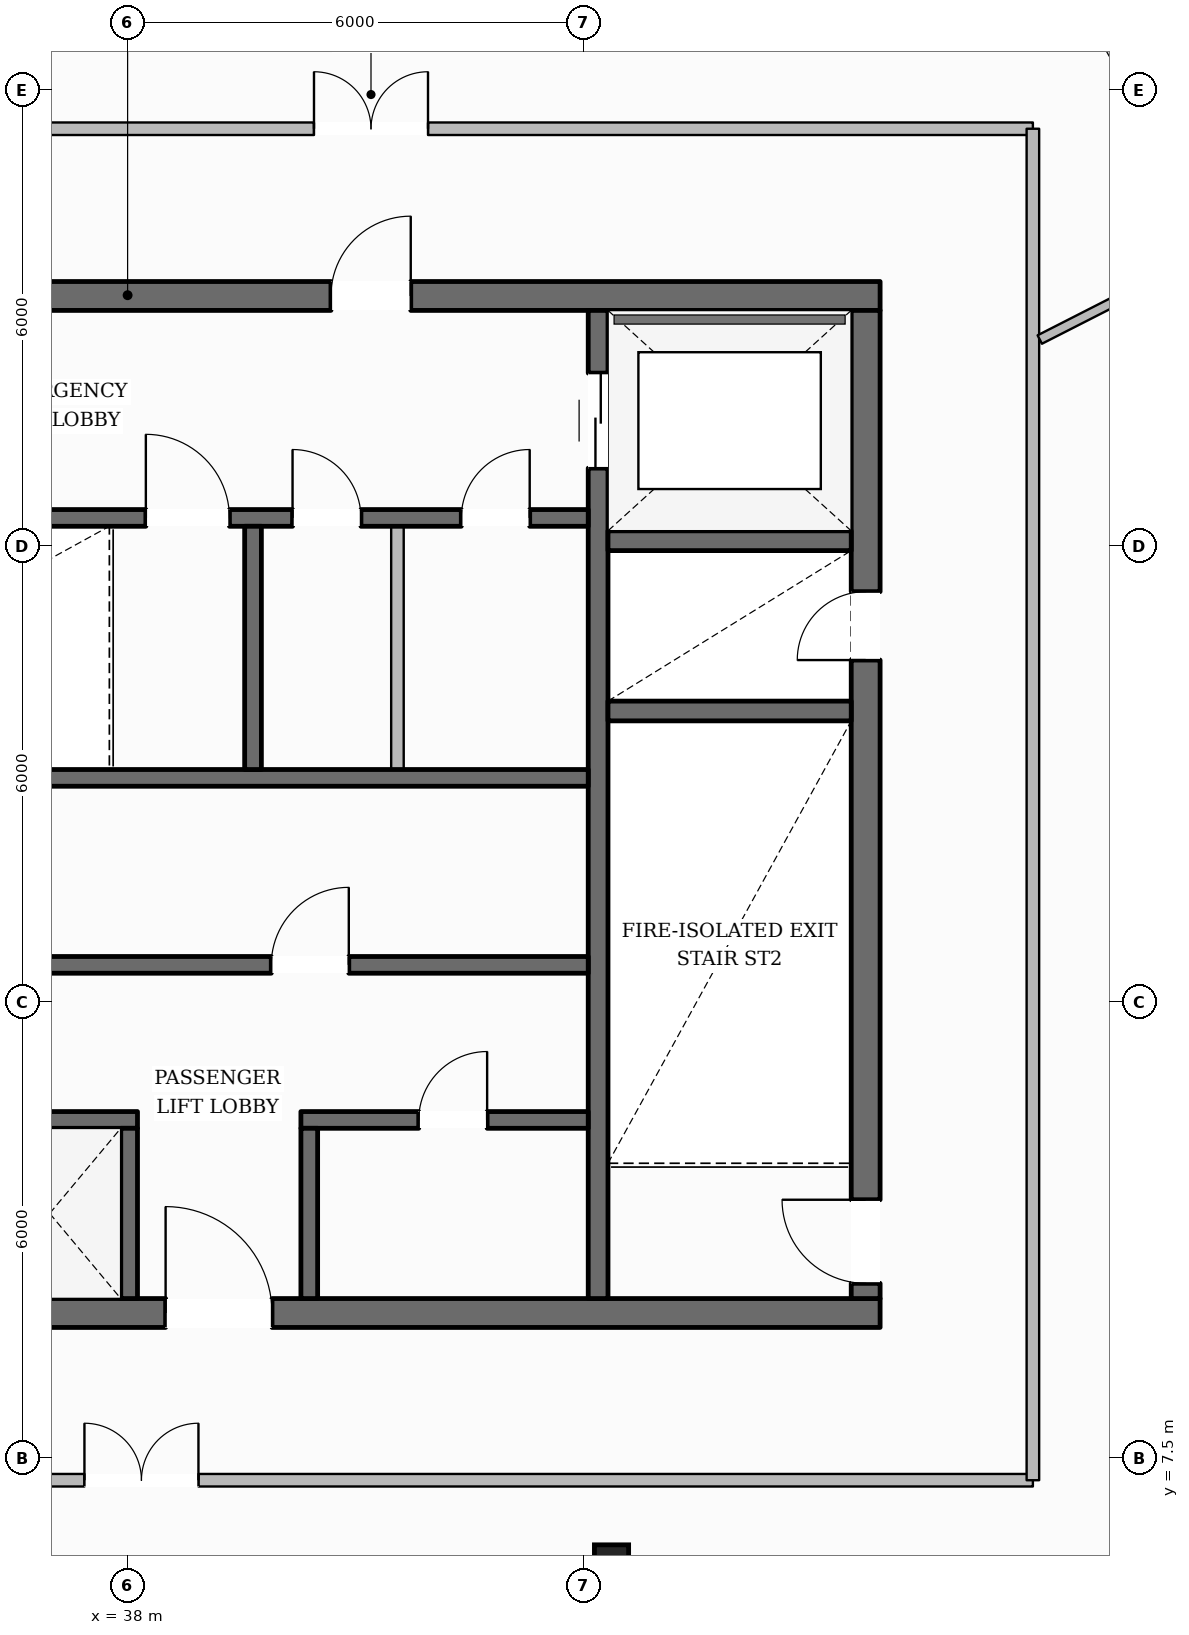
"""IFC4 building model, lengths in metres.
Left out: names, types, materials, properties, quantities, classifications, styles, units other than length and angle.
Written with IfcOpenShell. Run it as: python <this file> out.ifc"""

import sys

from ifc_helpers import new_model, si_unit, direction, frame, frame_2d, origin, origin_2d, place, context, subcontext, project, spatial, rectangle, hollow_rectangle, extrude, element, fill, save


model = new_model("IFC4")
c1 = context("Model", 3, precision=1e-05, world=origin(), true_north=direction((0.0, 1.0)))
c2 = subcontext(c1, "Body", "Model", "MODEL_VIEW")
j1 = project(units=[si_unit("LENGTHUNIT", "METRE"), si_unit("PLANEANGLEUNIT", "RADIAN")], contexts=[c1])
p1 = place(None, origin())
s1 = spatial("IfcSite", under=j1, at=p1, CompositionType="ELEMENT")
p2 = place(p1, origin())
s2 = spatial("IfcBuilding", under=s1, at=p2, CompositionType="ELEMENT")
p3 = place(p2, frame((0.0, 0.0, 309.95)))
s3 = spatial("IfcBuildingStorey", under=s2, at=p3, CompositionType="ELEMENT", Elevation=309.95)
p4 = place(p3, frame((28.1, 9.41, 0.0), z_axis=(0.0, 0.0, 1.0), x_axis=(1.0, 0.0, 0.0)))
e1 = element("IfcWall", 1, at=p4, inside=s3, PredefinedType="SOLIDWALL", context=c2, shape_type="SweptSolid", body=[
    extrude(rectangle(XDim=19.8, YDim=0.38, at=frame_2d((9.9, 0.0))), origin(), (0.0, 0.0, 1.0), 5.52),
])
p5 = place(p4, frame((10.4, 0.0, 0.0)))
e2 = element("IfcOpeningElement", 2, at=p5, cuts=e1, PredefinedType="OPENING", context=c2, shape_type="SweptSolid", body=[
    extrude(rectangle(XDim=1.4, YDim=2.2, at=frame_2d((0.7, 1.1))), frame((0.0, 0.2, 0.0), z_axis=(0.0, -1.0, 0.0), x_axis=(1.0, 0.0, 0.0)), (0.0, 0.0, 1.0), 0.4),
])
p6 = place(p3, frame((28.1, 22.79, 0.0), z_axis=(0.0, 0.0, 1.0), x_axis=(1.0, 0.0, 0.0)))
e3 = element("IfcWall", 3, at=p6, inside=s3, PredefinedType="SOLIDWALL", context=c2, shape_type="SweptSolid", body=[
    extrude(rectangle(XDim=19.8, YDim=0.38, at=frame_2d((9.9, 0.0))), origin(), (0.0, 0.0, 1.0), 5.52),
])
p7 = place(p6, frame((6.175, 0.0, 0.0)))
e4 = element("IfcOpeningElement", 4, at=p7, cuts=e3, PredefinedType="OPENING", context=c2, shape_type="SweptSolid", body=[
    extrude(rectangle(XDim=1.05, YDim=2.15, at=frame_2d((0.525, 1.075))), frame((0.0, 0.2, 0.0), z_axis=(0.0, -1.0, 0.0), x_axis=(1.0, 0.0, 0.0)), (0.0, 0.0, 1.0), 0.4),
])
p8 = place(p6, frame((12.575, 0.0, 0.0)))
e5 = element("IfcOpeningElement", 5, at=p8, cuts=e3, PredefinedType="OPENING", context=c2, shape_type="SweptSolid", body=[
    extrude(rectangle(XDim=1.05, YDim=2.15, at=frame_2d((0.525, 1.075))), frame((0.0, 0.2, 0.0), z_axis=(0.0, -1.0, 0.0), x_axis=(1.0, 0.0, 0.0)), (0.0, 0.0, 1.0), 0.4),
])
p9 = place(p3, frame((47.71, 9.6, 0.0), z_axis=(0.0, 0.0, 1.0), x_axis=(0.0, 1.0, 0.0)))
e6 = element("IfcWall", 6, at=p9, inside=s3, PredefinedType="SOLIDWALL", context=c2, shape_type="SweptSolid", body=[
    extrude(rectangle(XDim=13.0, YDim=0.38, at=frame_2d((6.5, 0.0))), origin(), (0.0, 0.0, 1.0), 5.52),
])
p10 = place(p9, frame((0.2, 0.0, 0.0)))
e7 = element("IfcOpeningElement", 7, at=p10, cuts=e6, PredefinedType="OPENING", context=c2, shape_type="SweptSolid", body=[
    extrude(rectangle(XDim=1.1, YDim=2.15, at=frame_2d((0.55, 1.075))), frame((0.0, 0.2, 0.0), z_axis=(0.0, -1.0, 0.0), x_axis=(1.0, 0.0, 0.0)), (0.0, 0.0, 1.0), 0.4),
])
p11 = place(p9, frame((8.4, 0.0, 0.0)))
e8 = element("IfcOpeningElement", 8, at=p11, cuts=e6, PredefinedType="OPENING", context=c2, shape_type="SweptSolid", body=[
    extrude(rectangle(XDim=0.9, YDim=2.1, at=frame_2d((0.45, 1.05))), frame((0.0, 0.2, 0.0), z_axis=(0.0, -1.0, 0.0), x_axis=(1.0, 0.0, 0.0)), (0.0, 0.0, 1.0), 0.4),
])
p12 = place(p3, frame((44.19, 9.6, 0.0), z_axis=(0.0, 0.0, 1.0), x_axis=(0.0, 1.0, 0.0)))
e9 = element("IfcWall", 9, at=p12, inside=s3, PredefinedType="SHEAR", context=c2, shape_type="SweptSolid", body=[
    extrude(rectangle(XDim=13.0, YDim=0.26, at=frame_2d((6.5, 0.0))), origin(), (0.0, 0.0, 1.0), 5.52),
])
p13 = place(p12, frame((10.925, 0.0, 0.0)))
e10 = element("IfcOpeningElement", 10, at=p13, cuts=e9, PredefinedType="OPENING", context=c2, shape_type="SweptSolid", body=[
    extrude(rectangle(XDim=1.25, YDim=2.25, at=frame_2d((0.625, 1.125))), frame((0.0, 0.14, 0.0), z_axis=(0.0, -1.0, 0.0), x_axis=(1.0, 0.0, 0.0)), (0.0, 0.0, 1.0), 0.28),
])
for number, where, z_axis, x_axis in (
    (11, (44.32, 17.33, 0.0), (0.0, 0.0, 1.0), (1.0, 0.0, 0.0)),
    (12, (44.32, 19.57, 0.0), (0.0, 0.0, 1.0), (1.0, 0.0, 0.0)),
):
    element("IfcWall", number, at=place(p3, frame(where, z_axis=z_axis, x_axis=x_axis)), inside=s3, PredefinedType="SHEAR", context=c2, shape_type="SweptSolid", body=[
        extrude(rectangle(XDim=3.2, YDim=0.26, at=frame_2d((1.6, 0.0))), origin(), (0.0, 0.0, 1.0), 5.52),
    ])
p14 = place(p3, frame((31.94, 19.87, 0.0), z_axis=(0.0, 0.0, 1.0), x_axis=(1.0, 0.0, 0.0)))
e13 = element("IfcWall", 13, at=p14, inside=s3, PredefinedType="SOLIDWALL", context=c2, shape_type="SweptSolid", body=[
    extrude(rectangle(XDim=12.12, YDim=0.22, at=frame_2d((6.06, 0.0))), origin(), (0.0, 0.0, 1.0), 5.52),
])
p15 = place(p14, frame((6.3, 0.0, 0.0)))
e14 = element("IfcOpeningElement", 14, at=p15, cuts=e13, PredefinedType="OPENING", context=c2, shape_type="SweptSolid", body=[
    extrude(rectangle(XDim=1.1, YDim=2.15, at=frame_2d((0.55, 1.075))), frame((0.0, 0.12, 0.0), z_axis=(0.0, -1.0, 0.0), x_axis=(1.0, 0.0, 0.0)), (0.0, 0.0, 1.0), 0.24),
])
p16 = place(p14, frame((8.23, 0.0, 0.0)))
e15 = element("IfcOpeningElement", 15, at=p16, cuts=e13, PredefinedType="OPENING", context=c2, shape_type="SweptSolid", body=[
    extrude(rectangle(XDim=0.9, YDim=2.1, at=frame_2d((0.45, 1.05))), frame((0.0, 0.12, 0.0), z_axis=(0.0, -1.0, 0.0), x_axis=(1.0, 0.0, 0.0)), (0.0, 0.0, 1.0), 0.24),
])
p17 = place(p14, frame((10.45, 0.0, 0.0)))
e16 = element("IfcOpeningElement", 16, at=p17, cuts=e13, PredefinedType="OPENING", context=c2, shape_type="SweptSolid", body=[
    extrude(rectangle(XDim=0.9, YDim=2.1, at=frame_2d((0.45, 1.05))), frame((0.0, 0.12, 0.0), z_axis=(0.0, -1.0, 0.0), x_axis=(1.0, 0.0, 0.0)), (0.0, 0.0, 1.0), 0.24),
])
p18 = place(p3, frame((31.94, 16.45, 0.0), z_axis=(0.0, 0.0, 1.0), x_axis=(1.0, 0.0, 0.0)))
e17 = element("IfcWall", 17, at=p18, inside=s3, PredefinedType="SOLIDWALL", context=c2, shape_type="SweptSolid", body=[
    extrude(rectangle(XDim=12.12, YDim=0.22, at=frame_2d((6.06, 0.0))), origin(), (0.0, 0.0, 1.0), 5.52),
])
p19 = place(p3, frame((39.65, 16.56, 0.0), z_axis=(0.0, 0.0, 1.0), x_axis=(0.0, 1.0, 0.0)))
e18 = element("IfcWall", 18, at=p19, inside=s3, PredefinedType="SOLIDWALL", context=c2, shape_type="SweptSolid", body=[
    extrude(rectangle(XDim=3.2, YDim=0.22, at=frame_2d((1.6, 0.0))), origin(), (0.0, 0.0, 1.0), 5.52),
])
p20 = place(p3, frame((31.94, 13.99, 0.0), z_axis=(0.0, 0.0, 1.0), x_axis=(1.0, 0.0, 0.0)))
e19 = element("IfcWall", 19, at=p20, inside=s3, PredefinedType="SOLIDWALL", context=c2, shape_type="SweptSolid", body=[
    extrude(rectangle(XDim=12.12, YDim=0.22, at=frame_2d((6.06, 0.0))), origin(), (0.0, 0.0, 1.0), 5.52),
])
p21 = place(p20, frame((1.91, 0.0, 0.0)))
e20 = element("IfcOpeningElement", 20, at=p21, cuts=e19, PredefinedType="OPENING", context=c2, shape_type="SweptSolid", body=[
    extrude(rectangle(XDim=0.9, YDim=2.1, at=frame_2d((0.45, 1.05))), frame((0.0, 0.12, 0.0), z_axis=(0.0, -1.0, 0.0), x_axis=(1.0, 0.0, 0.0)), (0.0, 0.0, 1.0), 0.24),
])
p22 = place(p20, frame((7.95, 0.0, 0.0)))
e21 = element("IfcOpeningElement", 21, at=p22, cuts=e19, PredefinedType="OPENING", context=c2, shape_type="SweptSolid", body=[
    extrude(rectangle(XDim=1.02, YDim=2.15, at=frame_2d((0.51, 1.075))), frame((0.0, 0.12, 0.0), z_axis=(0.0, -1.0, 0.0), x_axis=(1.0, 0.0, 0.0)), (0.0, 0.0, 1.0), 0.24),
])
p23 = place(p3, frame((31.94, 11.95, 0.0), z_axis=(0.0, 0.0, 1.0), x_axis=(1.0, 0.0, 0.0)))
e22 = element("IfcWall", 22, at=p23, inside=s3, PredefinedType="SOLIDWALL", context=c2, shape_type="SweptSolid", body=[
    extrude(rectangle(XDim=6.19, YDim=0.22, at=frame_2d((3.095, 0.0))), origin(), (0.0, 0.0, 1.0), 5.52),
])
p24 = place(p3, frame((40.28, 11.95, 0.0), z_axis=(0.0, 0.0, 1.0), x_axis=(1.0, 0.0, 0.0)))
e23 = element("IfcWall", 23, at=p24, inside=s3, PredefinedType="SOLIDWALL", context=c2, shape_type="SweptSolid", body=[
    extrude(rectangle(XDim=3.78, YDim=0.22, at=frame_2d((1.89, 0.0))), origin(), (0.0, 0.0, 1.0), 5.52),
])
p25 = place(p24, frame((1.55, 0.0, 0.0)))
e24 = element("IfcOpeningElement", 24, at=p25, cuts=e23, PredefinedType="OPENING", context=c2, shape_type="SweptSolid", body=[
    extrude(rectangle(XDim=0.9, YDim=2.1, at=frame_2d((0.45, 1.05))), frame((0.0, 0.12, 0.0), z_axis=(0.0, -1.0, 0.0), x_axis=(1.0, 0.0, 0.0)), (0.0, 0.0, 1.0), 0.24),
])
for number, where, z_axis, x_axis in (
    (25, (38.02, 9.6, 0.0), (0.0, 0.0, 1.0), (0.0, 1.0, 0.0)),
    (26, (40.39, 9.6, 0.0), (0.0, 0.0, 1.0), (0.0, 1.0, 0.0)),
):
    element("IfcWall", number, at=place(p3, frame(where, z_axis=z_axis, x_axis=x_axis)), inside=s3, PredefinedType="SOLIDWALL", context=c2, shape_type="SweptSolid", body=[
        extrude(rectangle(XDim=2.24, YDim=0.22, at=frame_2d((1.12, 0.0))), origin(), (0.0, 0.0, 1.0), 5.52),
    ])
p26 = place(p3, frame((44.366, 6.135, 0.0), z_axis=(0.0, 0.0, 1.0), x_axis=(1.0, 0.0, 0.0)))
e27 = element("IfcColumn", 27, at=p26, inside=s3, PredefinedType="USERDEFINED", context=c2, shape_type="SweptSolid", body=[
    extrude(hollow_rectangle(XDim=0.45, YDim=0.45, WallThickness=0.022, at=origin_2d()), origin(), (0.0, 0.0, 1.0), 5.52),
])
p27 = place(p3, frame((60.005, 10.332, 0.0), z_axis=(0.0, 0.0, 1.0), x_axis=(-0.490730545971, 0.87131138593, 0.0)))
e28 = element("IfcWall", 28, at=p27, inside=s3, PredefinedType="PARAPET", context=c2, shape_type="SweptSolid", body=[
    extrude(rectangle(XDim=30.325, YDim=0.21, at=frame_2d((15.163, 0.0))), origin(), (0.0, 0.0, 1.0), 0.55),
])
p28 = place(p3, frame((41.55, 16.56, 0.0), z_axis=(0.0, 0.0, 1.0), x_axis=(0.0, 1.0, 0.0)))
e29 = element("IfcWall", 29, at=p28, inside=s3, PredefinedType="PARTITIONING", context=c2, shape_type="SweptSolid", body=[
    extrude(rectangle(XDim=3.2, YDim=0.165, at=frame_2d((1.6, 0.0))), origin(), (0.0, 0.0, 1.0), 5.52),
])
p29 = place(p3, frame((26.09, 24.99, 0.0), z_axis=(0.0, 0.0, 1.0), x_axis=(1.0, 0.0, 0.0)))
e30 = element("IfcWall", 30, at=p29, inside=s3, PredefinedType="PARTITIONING", context=c2, shape_type="SweptSolid", body=[
    extrude(rectangle(XDim=23.82, YDim=0.165, at=frame_2d((11.91, 0.0))), origin(), (0.0, 0.0, 1.0), 5.52),
])
p30 = place(p29, frame((14.362, 0.0, 0.0)))
e31 = element("IfcOpeningElement", 31, at=p30, cuts=e30, PredefinedType="OPENING", context=c2, shape_type="SweptSolid", body=[
    extrude(rectangle(XDim=1.5, YDim=2.25, at=frame_2d((0.75, 1.125))), frame((0.0, 0.093, 0.0), z_axis=(0.0, -1.0, 0.0), x_axis=(1.0, 0.0, 0.0)), (0.0, 0.0, 1.0), 0.185),
])
p31 = place(p3, frame((26.09, 7.21, 0.0), z_axis=(0.0, 0.0, 1.0), x_axis=(1.0, 0.0, 0.0)))
e32 = element("IfcWall", 32, at=p31, inside=s3, PredefinedType="PARTITIONING", context=c2, shape_type="SweptSolid", body=[
    extrude(rectangle(XDim=23.82, YDim=0.165, at=frame_2d((11.91, 0.0))), origin(), (0.0, 0.0, 1.0), 5.52),
])
p32 = place(p31, frame((11.342, 0.0, 0.0)))
e33 = element("IfcOpeningElement", 33, at=p32, cuts=e32, PredefinedType="OPENING", context=c2, shape_type="SweptSolid", body=[
    extrude(rectangle(XDim=1.5, YDim=2.25, at=frame_2d((0.75, 1.125))), frame((0.0, 0.093, 0.0), z_axis=(0.0, -1.0, 0.0), x_axis=(1.0, 0.0, 0.0)), (0.0, 0.0, 1.0), 0.185),
])
p33 = place(p3, frame((49.91, 7.21, 0.0), z_axis=(0.0, 0.0, 1.0), x_axis=(0.0, 1.0, 0.0)))
e34 = element("IfcWall", 34, at=p33, inside=s3, PredefinedType="PARTITIONING", context=c2, shape_type="SweptSolid", body=[
    extrude(rectangle(XDim=17.78, YDim=0.165, at=frame_2d((8.89, 0.0))), origin(), (0.0, 0.0, 1.0), 5.52),
])
p34 = place(p3, frame((50.0, 22.217, 0.0), z_axis=(0.0, 0.0, 1.0), x_axis=(0.890906829521, 0.454186108454, 0.0)))
e35 = element("IfcWall", 35, at=p34, inside=s3, PredefinedType="PARTITIONING", context=c2, shape_type="SweptSolid", body=[
    extrude(rectangle(XDim=2.838, YDim=0.125, at=frame_2d((1.419, 0.0))), origin(), (0.0, 0.0, 1.0), 5.52),
])
p35 = place(p10, origin())
e36 = element("IfcDoor", 36, at=p35, inside=s3, OperationType="SINGLE_SWING_RIGHT", PredefinedType="DOOR", context=c2, shape_type="SweptSolid", body=[
    extrude(rectangle(XDim=1.1, YDim=2.15, at=frame_2d((0.55, 1.075))), frame((0.0, 0.025, 0.0), z_axis=(0.0, -1.0, 0.0), x_axis=(1.0, 0.0, 0.0)), (0.0, 0.0, 1.0), 0.05),
])
fill(e7, e36)
p36 = place(p15, origin())
e37 = element("IfcDoor", 37, at=p36, inside=s3, OperationType="SINGLE_SWING_LEFT", PredefinedType="DOOR", context=c2, shape_type="SweptSolid", body=[
    extrude(rectangle(XDim=1.1, YDim=2.15, at=frame_2d((0.55, 1.075))), frame((0.0, 0.025, 0.0), z_axis=(0.0, -1.0, 0.0), x_axis=(1.0, 0.0, 0.0)), (0.0, 0.0, 1.0), 0.05),
])
fill(e14, e37)
p37 = place(p11, origin())
e38 = element("IfcDoor", 38, at=p37, inside=s3, OperationType="SINGLE_SWING_LEFT", PredefinedType="DOOR", context=c2, shape_type="SweptSolid", body=[
    extrude(rectangle(XDim=0.9, YDim=2.1, at=frame_2d((0.45, 1.05))), frame((0.0, 0.025, 0.0), z_axis=(0.0, -1.0, 0.0), x_axis=(1.0, 0.0, 0.0)), (0.0, 0.0, 1.0), 0.05),
])
fill(e8, e38)
p38 = place(p8, origin())
e39 = element("IfcDoor", 39, at=p38, inside=s3, OperationType="SINGLE_SWING_RIGHT", PredefinedType="DOOR", context=c2, shape_type="SweptSolid", body=[
    extrude(rectangle(XDim=1.05, YDim=2.15, at=frame_2d((0.525, 1.075))), frame((0.0, 0.025, 0.0), z_axis=(0.0, -1.0, 0.0), x_axis=(1.0, 0.0, 0.0)), (0.0, 0.0, 1.0), 0.05),
])
fill(e5, e39)
p39 = place(p13, origin())
e40 = element("IfcDoor", 40, at=p39, inside=s3, OperationType="DOUBLE_DOOR_SLIDING", PredefinedType="DOOR", context=c2, shape_type="SweptSolid", body=[
    extrude(rectangle(XDim=1.25, YDim=2.25, at=frame_2d((0.625, 1.125))), frame((0.0, 0.025, 0.0), z_axis=(0.0, -1.0, 0.0), x_axis=(1.0, 0.0, 0.0)), (0.0, 0.0, 1.0), 0.05),
])
fill(e10, e40)
p40 = place(p5, origin())
e41 = element("IfcDoor", 41, at=p40, inside=s3, OperationType="SINGLE_SWING_LEFT", PredefinedType="DOOR", context=c2, shape_type="SweptSolid", body=[
    extrude(rectangle(XDim=1.4, YDim=2.2, at=frame_2d((0.7, 1.1))), frame((0.0, 0.025, 0.0), z_axis=(0.0, -1.0, 0.0), x_axis=(1.0, 0.0, 0.0)), (0.0, 0.0, 1.0), 0.05),
])
fill(e2, e41)
p41 = place(p22, origin())
e42 = element("IfcDoor", 42, at=p41, inside=s3, OperationType="SINGLE_SWING_RIGHT", PredefinedType="DOOR", context=c2, shape_type="SweptSolid", body=[
    extrude(rectangle(XDim=1.02, YDim=2.15, at=frame_2d((0.51, 1.075))), frame((0.0, 0.025, 0.0), z_axis=(0.0, -1.0, 0.0), x_axis=(1.0, 0.0, 0.0)), (0.0, 0.0, 1.0), 0.05),
])
fill(e21, e42)
p42 = place(p16, origin())
e43 = element("IfcDoor", 43, at=p42, inside=s3, OperationType="SINGLE_SWING_LEFT", PredefinedType="DOOR", context=c2, shape_type="SweptSolid", body=[
    extrude(rectangle(XDim=0.9, YDim=2.1, at=frame_2d((0.45, 1.05))), frame((0.0, 0.025, 0.0), z_axis=(0.0, -1.0, 0.0), x_axis=(1.0, 0.0, 0.0)), (0.0, 0.0, 1.0), 0.05),
])
fill(e15, e43)
p43 = place(p17, origin())
e44 = element("IfcDoor", 44, at=p43, inside=s3, OperationType="SINGLE_SWING_RIGHT", PredefinedType="DOOR", context=c2, shape_type="SweptSolid", body=[
    extrude(rectangle(XDim=0.9, YDim=2.1, at=frame_2d((0.45, 1.05))), frame((0.0, 0.025, 0.0), z_axis=(0.0, -1.0, 0.0), x_axis=(1.0, 0.0, 0.0)), (0.0, 0.0, 1.0), 0.05),
])
fill(e16, e44)
p44 = place(p25, origin())
e45 = element("IfcDoor", 45, at=p44, inside=s3, OperationType="SINGLE_SWING_RIGHT", PredefinedType="DOOR", context=c2, shape_type="SweptSolid", body=[
    extrude(rectangle(XDim=0.9, YDim=2.1, at=frame_2d((0.45, 1.05))), frame((0.0, 0.025, 0.0), z_axis=(0.0, -1.0, 0.0), x_axis=(1.0, 0.0, 0.0)), (0.0, 0.0, 1.0), 0.05),
])
fill(e24, e45)
p45 = place(p30, origin())
e46 = element("IfcDoor", 46, at=p45, inside=s3, OperationType="DOUBLE_DOOR_SINGLE_SWING", PredefinedType="DOOR", context=c2, shape_type="SweptSolid", body=[
    extrude(rectangle(XDim=1.5, YDim=2.25, at=frame_2d((0.75, 1.125))), frame((0.0, 0.025, 0.0), z_axis=(0.0, -1.0, 0.0), x_axis=(1.0, 0.0, 0.0)), (0.0, 0.0, 1.0), 0.05),
])
fill(e31, e46)
p46 = place(p32, origin())
e47 = element("IfcDoor", 47, at=p46, inside=s3, OperationType="DOUBLE_DOOR_SINGLE_SWING", PredefinedType="DOOR", context=c2, shape_type="SweptSolid", body=[
    extrude(rectangle(XDim=1.5, YDim=2.25, at=frame_2d((0.75, 1.125))), frame((0.0, 0.025, 0.0), z_axis=(0.0, -1.0, 0.0), x_axis=(1.0, 0.0, 0.0)), (0.0, 0.0, 1.0), 0.05),
])
fill(e33, e47)
save(model, sys.argv[1])
